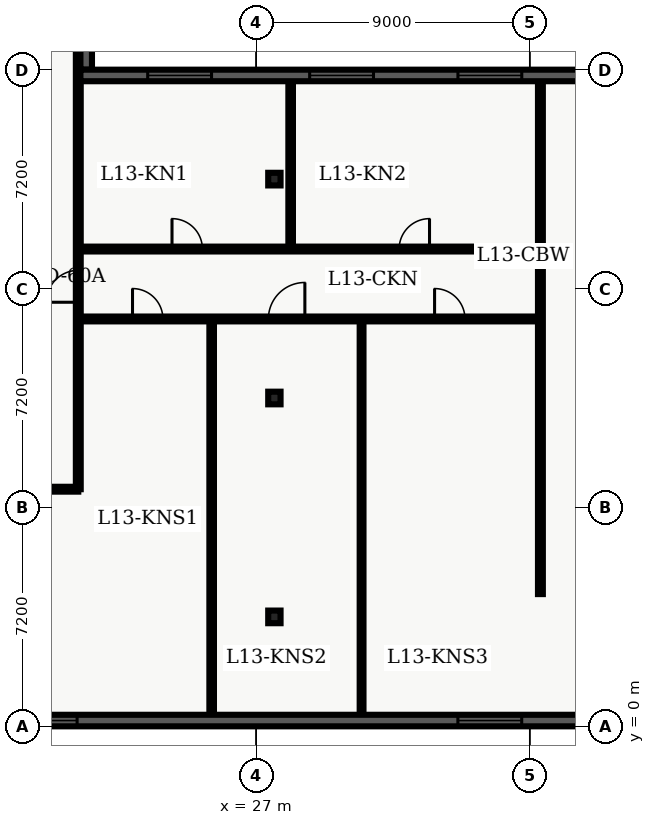
"""IFC4 building model, lengths in metres.
Left out: names, types, materials, properties, quantities, classifications, styles, units other than length and angle.
Written with IfcOpenShell. Run it as: python <this file> out.ifc"""

import sys

from ifc_helpers import new_model, entity, si_unit, converted_unit, direction, frame, origin_with_axes, origin_2d_with_axis, place, context, subcontext, project, spatial, polyline, rectangle, i_section, outline, extrude, element, fill, save


model = new_model("IFC4")
c1 = context("Model", 3, precision=1e-05, world=origin_with_axes(), true_north=direction((0.0, 1.0)))
c2 = subcontext(c1, "Body", "Model", "MODEL_VIEW")
j1 = project(units=[si_unit("LENGTHUNIT", "METRE"), converted_unit("PLANEANGLEUNIT", "DEGREE", entity("IfcPlaneAngleMeasure", 0.017), si_unit("PLANEANGLEUNIT", "RADIAN"), dimensions=[0, 0, 0, 0, 0, 0, 0])], contexts=[c1])
p1 = place(None, origin_with_axes())
s1 = spatial("IfcSite", under=j1, at=p1, CompositionType="ELEMENT")
p2 = place(p1, origin_with_axes())
s2 = spatial("IfcBuilding", under=s1, at=p2, CompositionType="ELEMENT")
p3 = place(p2, frame((0.0, 0.0, 56.1), z_axis=(0.0, 0.0, 1.0), x_axis=(1.0, 0.0, 0.0)))
s3 = spatial("IfcBuildingStorey", under=s2, at=p3, CompositionType="ELEMENT", Elevation=56.1)
for number, where, z_axis, x_axis in (
    (1, (27.6, 3.6, 0.0), (0.0, 0.0, 1.0), (1.0, 0.0, 0.0)),
    (2, (27.6, 10.8, 0.0), (0.0, 0.0, 1.0), (1.0, 0.0, 0.0)),
    (3, (27.6, 18.0, 0.0), (0.0, 0.0, 1.0), (1.0, 0.0, 0.0)),
):
    element("IfcColumn", number, at=place(p3, frame(where, z_axis=z_axis, x_axis=x_axis)), inside=s3, PredefinedType="COLUMN", context=c2, shape_type="SweptSolid", body=[
        extrude(i_section(OverallWidth=0.406, OverallDepth=0.416, WebThickness=0.03, FlangeThickness=0.048, FilletRadius=0.022, at=origin_2d_with_axis()), origin_with_axes(), (0.0, 0.0, 1.0), 3.9),
    ])
p4 = place(p3, frame((2.6, 7.8, 0.0), z_axis=(0.0, 0.0, 1.0), x_axis=(1.0, 0.0, 0.0)))
e4 = element("IfcWall", 4, at=p4, inside=s3, PredefinedType="PARTITIONING", context=c2, shape_type="SweptSolid", body=[
    extrude(outline(polyline([(0.0, -0.08), (18.55, -0.08), (18.55, 0.08), (0.0, 0.08), (0.0, -0.08)])), origin_with_axes(), (0.0, 0.0, 1.0), 2.7),
])
p5 = place(p4, frame((2.91, 0.0, 0.0), z_axis=(0.0, 0.0, 1.0), x_axis=(1.0, 0.0, 0.0)))
e5 = element("IfcOpeningElement", 5, at=p5, cuts=e4, PredefinedType="OPENING", context=c2, shape_type="SweptSolid", body=[
    extrude(rectangle(XDim=1.2, YDim=0.18, at=origin_2d_with_axis()), origin_with_axes(), (0.0, 0.0, 1.0), 2.2),
])
p6 = place(p4, frame((13.415, 0.0, 0.0), z_axis=(0.0, 0.0, 1.0), x_axis=(1.0, 0.0, 0.0)))
e6 = element("IfcOpeningElement", 6, at=p6, cuts=e4, PredefinedType="OPENING", context=c2, shape_type="SweptSolid", body=[
    extrude(rectangle(XDim=1.0, YDim=0.18, at=origin_2d_with_axis()), origin_with_axes(), (0.0, 0.0, 1.0), 2.15),
])
p7 = place(p3, frame((21.15, 7.8, 0.0), z_axis=(0.0, 0.0, 1.0), x_axis=(0.0, 1.0, 0.0)))
e7 = element("IfcWall", 7, at=p7, inside=s3, PredefinedType="PARTITIONING", context=c2, shape_type="SweptSolid", body=[
    extrude(outline(polyline([(0.0, -0.08), (32.7, -0.08), (32.7, 0.08), (0.0, 0.08), (0.0, -0.08)])), origin_with_axes(), (0.0, 0.0, 1.0), 2.7),
])
p8 = place(p7, frame((6.675, 0.0, 0.0), z_axis=(0.0, 0.0, 1.0), x_axis=(1.0, 0.0, 0.0)))
e8 = element("IfcOpeningElement", 8, at=p8, cuts=e7, PredefinedType="OPENING", context=c2, shape_type="SweptSolid", body=[
    extrude(rectangle(XDim=1.05, YDim=0.18, at=origin_2d_with_axis()), origin_with_axes(), (0.0, 0.0, 1.0), 2.15),
])
p9 = place(p3, frame((21.15, 13.4, 0.0), z_axis=(0.0, 0.0, 1.0), x_axis=(1.0, 0.0, 0.0)))
e9 = element("IfcWall", 9, at=p9, inside=s3, PredefinedType="PARTITIONING", context=c2, shape_type="SweptSolid", body=[
    extrude(outline(polyline([(0.0, -0.08), (15.2, -0.08), (15.2, 0.08), (0.0, 0.08), (0.0, -0.08)])), origin_with_axes(), (0.0, 0.0, 1.0), 2.7),
])
p10 = place(p9, frame((2.284, 0.0, 0.0), z_axis=(0.0, 0.0, 1.0), x_axis=(1.0, 0.0, 0.0)))
e10 = element("IfcOpeningElement", 10, at=p10, cuts=e9, PredefinedType="OPENING", context=c2, shape_type="SweptSolid", body=[
    extrude(rectangle(XDim=1.0, YDim=0.18, at=origin_2d_with_axis()), origin_with_axes(), (0.0, 0.0, 1.0), 2.15),
])
p11 = place(p9, frame((6.853, 0.0, 0.0), z_axis=(0.0, 0.0, 1.0), x_axis=(1.0, 0.0, 0.0)))
e11 = element("IfcOpeningElement", 11, at=p11, cuts=e9, PredefinedType="OPENING", context=c2, shape_type="SweptSolid", body=[
    extrude(rectangle(XDim=1.2, YDim=0.18, at=origin_2d_with_axis()), origin_with_axes(), (0.0, 0.0, 1.0), 2.2),
])
p12 = place(p9, frame((12.219, 0.0, 0.0), z_axis=(0.0, 0.0, 1.0), x_axis=(1.0, 0.0, 0.0)))
e12 = element("IfcOpeningElement", 12, at=p12, cuts=e9, PredefinedType="OPENING", context=c2, shape_type="SweptSolid", body=[
    extrude(rectangle(XDim=1.0, YDim=0.18, at=origin_2d_with_axis()), origin_with_axes(), (0.0, 0.0, 1.0), 2.15),
])
p13 = place(p3, frame((21.15, 15.7, 0.0), z_axis=(0.0, 0.0, 1.0), x_axis=(1.0, 0.0, 0.0)))
e13 = element("IfcWall", 13, at=p13, inside=s3, PredefinedType="PARTITIONING", context=c2, shape_type="SweptSolid", body=[
    extrude(outline(polyline([(0.0, -0.08), (15.2, -0.08), (15.2, 0.08), (0.0, 0.08), (0.0, -0.08)])), origin_with_axes(), (0.0, 0.0, 1.0), 2.7),
])
p14 = place(p13, frame((3.583, 0.0, 0.0), z_axis=(0.0, 0.0, 1.0), x_axis=(1.0, 0.0, 0.0)))
e14 = element("IfcOpeningElement", 14, at=p14, cuts=e13, PredefinedType="OPENING", context=c2, shape_type="SweptSolid", body=[
    extrude(rectangle(XDim=1.0, YDim=0.18, at=origin_2d_with_axis()), origin_with_axes(), (0.0, 0.0, 1.0), 2.15),
])
p15 = place(p13, frame((11.053, 0.0, 0.0), z_axis=(0.0, 0.0, 1.0), x_axis=(1.0, 0.0, 0.0)))
e15 = element("IfcOpeningElement", 15, at=p15, cuts=e13, PredefinedType="OPENING", context=c2, shape_type="SweptSolid", body=[
    extrude(rectangle(XDim=1.0, YDim=0.18, at=origin_2d_with_axis()), origin_with_axes(), (0.0, 0.0, 1.0), 2.15),
])
p16 = place(p3, frame((36.35, 4.35, 0.0), z_axis=(0.0, 0.0, 1.0), x_axis=(0.0, 1.0, 0.0)))
e16 = element("IfcWall", 16, at=p16, inside=s3, PredefinedType="PARTITIONING", context=c2, shape_type="SweptSolid", body=[
    extrude(outline(polyline([(0.0, -0.08), (16.95, -0.08), (16.95, 0.08), (0.0, 0.08), (0.0, -0.08)])), origin_with_axes(), (0.0, 0.0, 1.0), 2.7),
])
p17 = place(p3, frame((25.537, 0.36, 0.0), z_axis=(0.0, 0.0, 1.0), x_axis=(0.0, 1.0, 0.0)))
e17 = element("IfcWall", 17, at=p17, inside=s3, PredefinedType="PARTITIONING", context=c2, shape_type="SweptSolid", body=[
    extrude(outline(polyline([(0.0, -0.075), (12.92, -0.075), (12.92, 0.075), (0.0, 0.075), (0.0, -0.075)])), origin_with_axes(), (0.0, 0.0, 1.0), 2.7),
])
p18 = place(p3, frame((30.468, 0.36, 0.0), z_axis=(0.0, 0.0, 1.0), x_axis=(0.0, 1.0, 0.0)))
e18 = element("IfcWall", 18, at=p18, inside=s3, PredefinedType="PARTITIONING", context=c2, shape_type="SweptSolid", body=[
    extrude(outline(polyline([(0.0, -0.062), (12.92, -0.062), (12.92, 0.062), (0.0, 0.062), (0.0, -0.062)])), origin_with_axes(), (0.0, 0.0, 1.0), 2.7),
])
p19 = place(p3, frame((28.135, 15.82, 0.0), z_axis=(0.0, 0.0, 1.0), x_axis=(0.0, 1.0, 0.0)))
e19 = element("IfcWall", 19, at=p19, inside=s3, PredefinedType="PARTITIONING", context=c2, shape_type="SweptSolid", body=[
    extrude(outline(polyline([(0.0, -0.075), (5.405, -0.075), (5.405, 0.075), (0.0, 0.075), (0.0, -0.075)])), origin_with_axes(), (0.0, 0.0, 1.0), 2.7),
])
p20 = place(p3, frame((57.22, 0.19, 0.0), z_axis=(0.0, 0.0, 1.0), x_axis=(-1.0, 0.0, 0.0)))
e20 = element("IfcWall", 20, at=p20, inside=s3, PredefinedType="SOLIDWALL", context=c2, shape_type="SweptSolid", body=[
    extrude(outline(polyline([(0.0, -0.19), (54.82, -0.19), (54.82, 0.19), (0.0, 0.19), (0.0, -0.19)])), origin_with_axes(), (0.0, 0.0, 1.0), 3.66),
])
p21 = place(p20, frame((3.037, 0.0, 0.45), z_axis=(0.0, 0.0, 1.0), x_axis=(1.0, 0.0, 0.0)))
e21 = element("IfcOpeningElement", 21, at=p21, cuts=e20, PredefinedType="OPENING", context=c2, shape_type="SweptSolid", body=[
    extrude(rectangle(XDim=2.1, YDim=0.4, at=origin_2d_with_axis()), origin_with_axes(), (0.0, 0.0, 1.0), 2.2),
])
p22 = place(p20, frame((7.912, 0.0, 0.45), z_axis=(0.0, 0.0, 1.0), x_axis=(1.0, 0.0, 0.0)))
e22 = element("IfcOpeningElement", 22, at=p22, cuts=e20, PredefinedType="OPENING", context=c2, shape_type="SweptSolid", body=[
    extrude(rectangle(XDim=2.1, YDim=0.4, at=origin_2d_with_axis()), origin_with_axes(), (0.0, 0.0, 1.0), 2.2),
])
p23 = place(p20, frame((12.786, 0.0, 0.45), z_axis=(0.0, 0.0, 1.0), x_axis=(1.0, 0.0, 0.0)))
e23 = element("IfcOpeningElement", 23, at=p23, cuts=e20, PredefinedType="OPENING", context=c2, shape_type="SweptSolid", body=[
    extrude(rectangle(XDim=2.1, YDim=0.4, at=origin_2d_with_axis()), origin_with_axes(), (0.0, 0.0, 1.0), 2.2),
])
p24 = place(p20, frame((17.661, 0.0, 0.45), z_axis=(0.0, 0.0, 1.0), x_axis=(1.0, 0.0, 0.0)))
e24 = element("IfcOpeningElement", 24, at=p24, cuts=e20, PredefinedType="OPENING", context=c2, shape_type="SweptSolid", body=[
    extrude(rectangle(XDim=2.1, YDim=0.4, at=origin_2d_with_axis()), origin_with_axes(), (0.0, 0.0, 1.0), 2.2),
])
p25 = place(p20, frame((22.535, 0.0, 0.45), z_axis=(0.0, 0.0, 1.0), x_axis=(1.0, 0.0, 0.0)))
e25 = element("IfcOpeningElement", 25, at=p25, cuts=e20, PredefinedType="OPENING", context=c2, shape_type="SweptSolid", body=[
    extrude(rectangle(XDim=2.1, YDim=0.4, at=origin_2d_with_axis()), origin_with_axes(), (0.0, 0.0, 1.0), 2.2),
])
p26 = place(p20, frame((37.159, 0.0, 0.45), z_axis=(0.0, 0.0, 1.0), x_axis=(1.0, 0.0, 0.0)))
e26 = element("IfcOpeningElement", 26, at=p26, cuts=e20, PredefinedType="OPENING", context=c2, shape_type="SweptSolid", body=[
    extrude(rectangle(XDim=2.1, YDim=0.4, at=origin_2d_with_axis()), origin_with_axes(), (0.0, 0.0, 1.0), 2.2),
])
p27 = place(p20, frame((42.034, 0.0, 0.45), z_axis=(0.0, 0.0, 1.0), x_axis=(1.0, 0.0, 0.0)))
e27 = element("IfcOpeningElement", 27, at=p27, cuts=e20, PredefinedType="OPENING", context=c2, shape_type="SweptSolid", body=[
    extrude(rectangle(XDim=2.1, YDim=0.4, at=origin_2d_with_axis()), origin_with_axes(), (0.0, 0.0, 1.0), 2.2),
])
p28 = place(p20, frame((51.783, 0.0, 0.45), z_axis=(0.0, 0.0, 1.0), x_axis=(1.0, 0.0, 0.0)))
e28 = element("IfcOpeningElement", 28, at=p28, cuts=e20, PredefinedType="OPENING", context=c2, shape_type="SweptSolid", body=[
    extrude(rectangle(XDim=2.1, YDim=0.4, at=origin_2d_with_axis()), origin_with_axes(), (0.0, 0.0, 1.0), 2.2),
])
p29 = place(p3, frame((21.41, 45.82, 0.0), z_axis=(0.0, 0.0, 1.0), x_axis=(0.0, -1.0, 0.0)))
e29 = element("IfcWall", 29, at=p29, inside=s3, PredefinedType="SOLIDWALL", context=c2, shape_type="SweptSolid", body=[
    extrude(outline(polyline([(0.0, -0.19), (24.22, -0.19), (24.22, 0.19), (0.0, 0.19), (0.0, -0.19)])), origin_with_axes(), (0.0, 0.0, 1.0), 3.66),
])
p30 = place(p29, frame((2.902, 0.0, 0.45), z_axis=(0.0, 0.0, 1.0), x_axis=(1.0, 0.0, 0.0)))
e30 = element("IfcOpeningElement", 30, at=p30, cuts=e29, PredefinedType="OPENING", context=c2, shape_type="SweptSolid", body=[
    extrude(rectangle(XDim=2.1, YDim=0.4, at=origin_2d_with_axis()), origin_with_axes(), (0.0, 0.0, 1.0), 2.2),
])
p31 = place(p3, frame((21.22, 21.41, 0.0), z_axis=(0.0, 0.0, 1.0), x_axis=(1.0, 0.0, 0.0)))
e31 = element("IfcWall", 31, at=p31, inside=s3, PredefinedType="SOLIDWALL", context=c2, shape_type="SweptSolid", body=[
    extrude(outline(polyline([(0.0, -0.19), (17.18, -0.19), (17.18, 0.19), (0.0, 0.19), (0.0, -0.19)])), origin_with_axes(), (0.0, 0.0, 1.0), 3.66),
])
p32 = place(p31, frame((3.263, 0.0, 0.45), z_axis=(0.0, 0.0, 1.0), x_axis=(1.0, 0.0, 0.0)))
e32 = element("IfcOpeningElement", 32, at=p32, cuts=e31, PredefinedType="OPENING", context=c2, shape_type="SweptSolid", body=[
    extrude(rectangle(XDim=2.1, YDim=0.4, at=origin_2d_with_axis()), origin_with_axes(), (0.0, 0.0, 1.0), 2.2),
])
p33 = place(p31, frame((8.59, 0.0, 0.45), z_axis=(0.0, 0.0, 1.0), x_axis=(1.0, 0.0, 0.0)))
e33 = element("IfcOpeningElement", 33, at=p33, cuts=e31, PredefinedType="OPENING", context=c2, shape_type="SweptSolid", body=[
    extrude(rectangle(XDim=2.1, YDim=0.4, at=origin_2d_with_axis()), origin_with_axes(), (0.0, 0.0, 1.0), 2.2),
])
p34 = place(p31, frame((13.467, 0.0, 0.45), z_axis=(0.0, 0.0, 1.0), x_axis=(1.0, 0.0, 0.0)))
e34 = element("IfcOpeningElement", 34, at=p34, cuts=e31, PredefinedType="OPENING", context=c2, shape_type="SweptSolid", body=[
    extrude(rectangle(XDim=2.1, YDim=0.4, at=origin_2d_with_axis()), origin_with_axes(), (0.0, 0.0, 1.0), 2.2),
])
p35 = place(p7, frame((6.675, 0.0, 0.0), z_axis=(0.0, 0.0, 1.0), x_axis=(1.0, 0.0, 0.0)))
e35 = element("IfcDoor", 35, at=p35, inside=s3, OperationType="SINGLE_SWING_LEFT", PredefinedType="DOOR", context=c2, shape_type="SweptSolid", body=[
    extrude(rectangle(XDim=1.05, YDim=0.09, at=origin_2d_with_axis()), origin_with_axes(), (0.0, 0.0, 1.0), 2.15),
])
fill(e8, e35)
p36 = place(p9, frame((2.284, 0.0, 0.0), z_axis=(0.0, 0.0, 1.0), x_axis=(1.0, 0.0, 0.0)))
e36 = element("IfcDoor", 36, at=p36, inside=s3, OperationType="SINGLE_SWING_LEFT", PredefinedType="DOOR", context=c2, shape_type="SweptSolid", body=[
    extrude(rectangle(XDim=1.0, YDim=0.09, at=origin_2d_with_axis()), origin_with_axes(), (0.0, 0.0, 1.0), 2.15),
])
fill(e10, e36)
p37 = place(p9, frame((6.853, 0.0, 0.0), z_axis=(0.0, 0.0, 1.0), x_axis=(1.0, 0.0, 0.0)))
e37 = element("IfcDoor", 37, at=p37, inside=s3, OperationType="SINGLE_SWING_RIGHT", PredefinedType="DOOR", context=c2, shape_type="SweptSolid", body=[
    extrude(rectangle(XDim=1.2, YDim=0.09, at=origin_2d_with_axis()), origin_with_axes(), (0.0, 0.0, 1.0), 2.2),
])
fill(e11, e37)
p38 = place(p9, frame((12.219, 0.0, 0.0), z_axis=(0.0, 0.0, 1.0), x_axis=(1.0, 0.0, 0.0)))
e38 = element("IfcDoor", 38, at=p38, inside=s3, OperationType="SINGLE_SWING_LEFT", PredefinedType="DOOR", context=c2, shape_type="SweptSolid", body=[
    extrude(rectangle(XDim=1.0, YDim=0.09, at=origin_2d_with_axis()), origin_with_axes(), (0.0, 0.0, 1.0), 2.15),
])
fill(e12, e38)
p39 = place(p13, frame((3.583, 0.0, 0.0), z_axis=(0.0, 0.0, 1.0), x_axis=(1.0, 0.0, 0.0)))
e39 = element("IfcDoor", 39, at=p39, inside=s3, OperationType="SINGLE_SWING_LEFT", PredefinedType="DOOR", context=c2, shape_type="SweptSolid", body=[
    extrude(rectangle(XDim=1.0, YDim=0.09, at=origin_2d_with_axis()), origin_with_axes(), (0.0, 0.0, 1.0), 2.15),
])
fill(e14, e39)
p40 = place(p13, frame((11.053, 0.0, 0.0), z_axis=(0.0, 0.0, 1.0), x_axis=(1.0, 0.0, 0.0)))
e40 = element("IfcDoor", 40, at=p40, inside=s3, OperationType="SINGLE_SWING_RIGHT", PredefinedType="DOOR", context=c2, shape_type="SweptSolid", body=[
    extrude(rectangle(XDim=1.0, YDim=0.09, at=origin_2d_with_axis()), origin_with_axes(), (0.0, 0.0, 1.0), 2.15),
])
fill(e15, e40)
p41 = place(p20, frame((22.535, 0.0, 0.45), z_axis=(0.0, 0.0, 1.0), x_axis=(1.0, 0.0, 0.0)))
e41 = element("IfcWindow", 41, at=p41, inside=s3, PredefinedType="WINDOW", context=c2, shape_type="SweptSolid", body=[
    extrude(rectangle(XDim=2.1, YDim=0.09, at=origin_2d_with_axis()), origin_with_axes(), (0.0, 0.0, 1.0), 2.2),
])
fill(e25, e41)
p42 = place(p20, frame((37.159, 0.0, 0.45), z_axis=(0.0, 0.0, 1.0), x_axis=(1.0, 0.0, 0.0)))
e42 = element("IfcWindow", 42, at=p42, inside=s3, PredefinedType="WINDOW", context=c2, shape_type="SweptSolid", body=[
    extrude(rectangle(XDim=2.1, YDim=0.09, at=origin_2d_with_axis()), origin_with_axes(), (0.0, 0.0, 1.0), 2.2),
])
fill(e26, e42)
p43 = place(p31, frame((3.263, 0.0, 0.45), z_axis=(0.0, 0.0, 1.0), x_axis=(1.0, 0.0, 0.0)))
e43 = element("IfcWindow", 43, at=p43, inside=s3, PredefinedType="WINDOW", context=c2, shape_type="SweptSolid", body=[
    extrude(rectangle(XDim=2.1, YDim=0.09, at=origin_2d_with_axis()), origin_with_axes(), (0.0, 0.0, 1.0), 2.2),
])
fill(e32, e43)
p44 = place(p31, frame((8.59, 0.0, 0.45), z_axis=(0.0, 0.0, 1.0), x_axis=(1.0, 0.0, 0.0)))
e44 = element("IfcWindow", 44, at=p44, inside=s3, PredefinedType="WINDOW", context=c2, shape_type="SweptSolid", body=[
    extrude(rectangle(XDim=2.1, YDim=0.09, at=origin_2d_with_axis()), origin_with_axes(), (0.0, 0.0, 1.0), 2.2),
])
fill(e33, e44)
p45 = place(p31, frame((13.467, 0.0, 0.45), z_axis=(0.0, 0.0, 1.0), x_axis=(1.0, 0.0, 0.0)))
e45 = element("IfcWindow", 45, at=p45, inside=s3, PredefinedType="WINDOW", context=c2, shape_type="SweptSolid", body=[
    extrude(rectangle(XDim=2.1, YDim=0.09, at=origin_2d_with_axis()), origin_with_axes(), (0.0, 0.0, 1.0), 2.2),
])
fill(e34, e45)
save(model, sys.argv[1])
